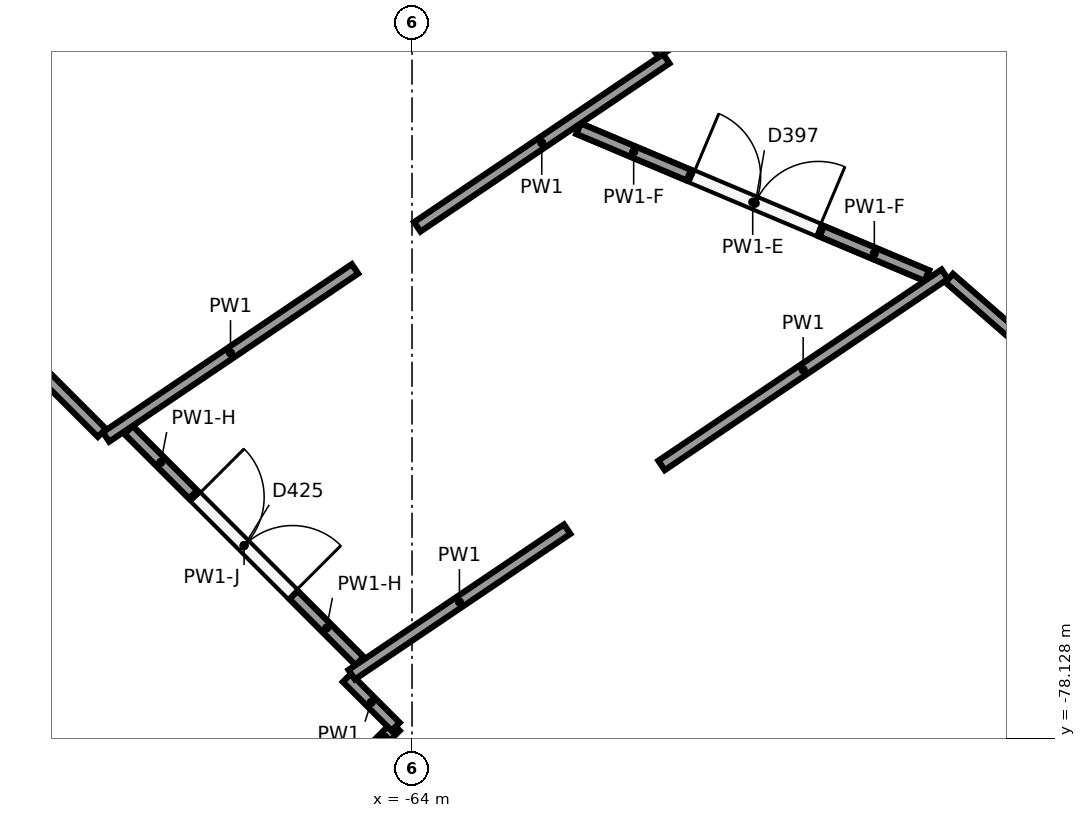
"""IFC4 building model, lengths in metres.
Left out: names, types, materials, properties, quantities, classifications, styles, units other than length and angle.
Written with IfcOpenShell. Run it as: python <this file> out.ifc"""

import sys

from ifc_helpers import new_model, si_unit, direction, frame, frame_2d, origin, origin_2d, place, context, subcontext, project, spatial, rectangle, circle, extrude, element, fill, save


model = new_model("IFC4")
c1 = context("Model", 3, precision=1e-05, world=origin(), true_north=direction((0.0, 1.0)))
c2 = subcontext(c1, "Body", "Model", "MODEL_VIEW")
j1 = project(units=[si_unit("LENGTHUNIT", "METRE"), si_unit("PLANEANGLEUNIT", "RADIAN")], contexts=[c1])
p1 = place(None, origin())
s1 = spatial("IfcSite", under=j1, at=p1, CompositionType="ELEMENT")
p2 = place(p1, origin())
s2 = spatial("IfcBuilding", under=s1, at=p2, CompositionType="ELEMENT")
p3 = place(p2, origin())
s3 = spatial("IfcBuildingStorey", under=s2, at=p3, CompositionType="ELEMENT", Elevation=0.0)
p4 = place(p3, frame((-63.068, -73.47, 0.0), z_axis=(0.0, 0.0, 1.0), x_axis=(1.0, 0.0, 0.0)))
e1 = element("IfcColumn", 1, at=p4, inside=s3, PredefinedType="COLUMN", context=c2, shape_type="SweptSolid", body=[
    extrude(circle(Radius=0.45, at=origin_2d()), origin(), (0.0, 0.0, 1.0), 6.5),
])
p5 = place(p3, frame((-60.655, -69.186, 0.0), z_axis=(0.0, 0.0, 1.0), x_axis=(-0.828805713465, -0.559536495081, 0.0)))
e2 = element("IfcWall", 2, at=p5, inside=s3, PredefinedType="PARTITIONING", context=c2, shape_type="SweptSolid", body=[
    extrude(rectangle(XDim=3.953, YDim=0.15, at=frame_2d((1.977, 0.0))), origin(), (0.0, 0.0, 1.0), 6.15),
])
p6 = place(p3, frame((-64.75, -71.951, 0.0), z_axis=(0.0, 0.0, 1.0), x_axis=(-0.828815019126, -0.559522710952, 0.0)))
e3 = element("IfcWall", 3, at=p6, inside=s3, PredefinedType="PARTITIONING", context=c2, shape_type="SweptSolid", body=[
    extrude(rectangle(XDim=3.953, YDim=0.15, at=frame_2d((1.977, 0.0))), origin(), (0.0, 0.0, 1.0), 6.15),
])
p7 = place(p3, frame((-68.08, -74.109, 0.0), z_axis=(0.0, 0.0, 1.0), x_axis=(-0.70712613939, 0.707087422453, 0.0)))
e4 = element("IfcWall", 4, at=p7, inside=s3, PredefinedType="PARTITIONING", context=c2, shape_type="SweptSolid", body=[
    extrude(rectangle(XDim=6.306, YDim=0.15, at=frame_2d((3.153, 0.0))), origin(), (0.0, 0.0, 1.0), 6.15),
])
p8 = place(p3, frame((-63.251, -65.301, 0.0), z_axis=(0.0, 0.0, 1.0), x_axis=(0.555582071925, -0.831461701677, 0.0)))
e5 = element("IfcWall", 5, at=p8, inside=s3, PredefinedType="PARTITIONING", context=c2, shape_type="SweptSolid", body=[
    extrude(rectangle(XDim=4.598, YDim=0.15, at=frame_2d((2.299, 0.0))), origin(), (0.0, 0.0, 1.0), 6.15),
])
p9 = place(p3, frame((-64.496, -78.254, 0.0), z_axis=(0.0, 0.0, 1.0), x_axis=(0.706798874946, 0.707414553409, 0.0)))
e6 = element("IfcWall", 6, at=p9, inside=s3, PredefinedType="PARTITIONING", context=c2, shape_type="SweptSolid", body=[
    extrude(rectangle(XDim=0.396, YDim=0.15, at=frame_2d((0.198, 0.0))), origin(), (0.0, 0.0, 1.0), 6.15),
])
p10 = place(p3, frame((-64.216, -77.973, 0.0), z_axis=(0.0, 0.0, 1.0), x_axis=(-0.707106781187, 0.707106781187, 0.0)))
e7 = element("IfcWall", 7, at=p10, inside=s3, PredefinedType="PARTITIONING", context=c2, shape_type="SweptSolid", body=[
    extrude(rectangle(XDim=0.907, YDim=0.15, at=frame_2d((0.454, 0.0))), origin(), (0.0, 0.0, 1.0), 6.15),
])
p11 = place(p3, frame((-64.794, -77.289, 0.0), z_axis=(0.0, 0.0, 1.0), x_axis=(0.828829640135, 0.559501052397, 0.0)))
e8 = element("IfcWall", 8, at=p11, inside=s3, PredefinedType="PARTITIONING", context=c2, shape_type="SweptSolid", body=[
    extrude(rectangle(XDim=3.42, YDim=0.15, at=frame_2d((1.71, 0.0))), origin(), (0.0, 0.0, 1.0), 6.15),
])
p12 = place(p3, frame((-60.717, -74.537, 0.0), z_axis=(0.0, 0.0, 1.0), x_axis=(0.828836712626, 0.559490575259, 0.0)))
e9 = element("IfcWall", 9, at=p12, inside=s3, PredefinedType="PARTITIONING", context=c2, shape_type="SweptSolid", body=[
    extrude(rectangle(XDim=4.496, YDim=0.15, at=frame_2d((2.248, 0.0))), origin(), (0.0, 0.0, 1.0), 6.15),
])
p13 = place(p3, frame((-56.932, -72.073, 0.0), z_axis=(0.0, 0.0, 1.0), x_axis=(0.753910661327, -0.656976951451, 0.0)))
e10 = element("IfcWall", 10, at=p13, inside=s3, PredefinedType="PARTITIONING", context=c2, shape_type="SweptSolid", body=[
    extrude(rectangle(XDim=4.473, YDim=0.15, at=frame_2d((2.237, 0.0))), origin(), (0.0, 0.0, 1.0), 6.15),
])
p14 = place(p3, frame((-67.729, -74.071, 0.0), z_axis=(0.0, 0.0, 1.0), x_axis=(0.707106781187, -0.707106781187, 0.0)))
e11 = element("IfcWall", 11, at=p14, inside=s3, PredefinedType="PARTITIONING", context=c2, shape_type="SweptSolid", body=[
    extrude(rectangle(XDim=4.298, YDim=0.15, at=frame_2d((2.149, 0.0))), origin(), (0.0, 0.0, 1.0), 5.05),
])
p15 = place(p14, frame((1.25, 0.0, 0.0)))
e12 = element("IfcOpeningElement", 12, at=p15, cuts=e11, PredefinedType="OPENING", context=c2, shape_type="SweptSolid", body=[
    extrude(rectangle(XDim=1.8, YDim=2.1, at=frame_2d((0.9, 1.05))), frame((0.0, 0.085, 0.0), z_axis=(0.0, -1.0, 0.0), x_axis=(1.0, 0.0, 0.0)), (0.0, 0.0, 1.0), 0.17),
])
p16 = place(p3, frame((-67.729, -74.071, 5.05), z_axis=(0.0, 0.0, 1.0), x_axis=(0.707106781187, -0.707106781187, 0.0)))
e13 = element("IfcWall", 13, at=p16, inside=s3, PredefinedType="PARTITIONING", context=c2, shape_type="SweptSolid", body=[
    extrude(rectangle(XDim=1.2, YDim=0.15, at=frame_2d((0.6, 0.0))), origin(), (0.0, 0.0, 1.0), 1.1),
])
p17 = place(p3, frame((-65.559, -76.241, 5.05), z_axis=(0.0, 0.0, 1.0), x_axis=(0.707106781187, -0.707106781187, 0.0)))
e14 = element("IfcWall", 14, at=p17, inside=s3, PredefinedType="PARTITIONING", context=c2, shape_type="SweptSolid", body=[
    extrude(rectangle(XDim=1.229, YDim=0.15, at=frame_2d((0.614, 0.0))), origin(), (0.0, 0.0, 1.0), 1.1),
])
p18 = place(p3, frame((-61.809, -70.106, 0.0), z_axis=(0.0, 0.0, 1.0), x_axis=(0.921339438191, -0.388759102316, 0.0)))
e15 = element("IfcWall", 15, at=p18, inside=s3, PredefinedType="PARTITIONING", context=c2, shape_type="SweptSolid", body=[
    extrude(rectangle(XDim=4.974, YDim=0.15, at=frame_2d((2.487, 0.0))), origin(), (0.0, 0.0, 1.0), 5.25),
])
p19 = place(p18, frame((1.624, 0.0, 0.0)))
e16 = element("IfcOpeningElement", 16, at=p19, cuts=e15, PredefinedType="OPENING", context=c2, shape_type="SweptSolid", body=[
    extrude(rectangle(XDim=1.8, YDim=2.1, at=frame_2d((0.9, 1.05))), frame((0.0, 0.085, 0.0), z_axis=(0.0, -1.0, 0.0), x_axis=(1.0, 0.0, 0.0)), (0.0, 0.0, 1.0), 0.17),
])
p20 = place(p3, frame((-58.608, -71.457, 5.25), z_axis=(0.0, 0.0, 1.0), x_axis=(0.92131952974, -0.388806280966, 0.0)))
e17 = element("IfcWall", 17, at=p20, inside=s3, PredefinedType="PARTITIONING", context=c2, shape_type="SweptSolid", body=[
    extrude(rectangle(XDim=1.5, YDim=0.15, at=frame_2d((0.75, 0.0))), origin(), (0.0, 0.0, 1.0), 0.9),
])
p21 = place(p3, frame((-61.809, -70.106, 5.25), z_axis=(0.0, 0.0, 1.0), x_axis=(0.921337247527, -0.38876429404, 0.0)))
e18 = element("IfcWall", 18, at=p21, inside=s3, PredefinedType="PARTITIONING", context=c2, shape_type="SweptSolid", body=[
    extrude(rectangle(XDim=1.574, YDim=0.15, at=frame_2d((0.787, 0.0))), origin(), (0.0, 0.0, 1.0), 0.9),
])
p22 = place(p15, origin())
e19 = element("IfcDoor", 19, at=p22, inside=s3, OperationType="DOUBLE_DOOR_SINGLE_SWING", PredefinedType="DOOR", context=c2, shape_type="SweptSolid", body=[
    extrude(rectangle(XDim=1.8, YDim=2.1, at=frame_2d((0.9, 1.05))), frame((0.0, 0.025, 0.0), z_axis=(0.0, -1.0, 0.0), x_axis=(1.0, 0.0, 0.0)), (0.0, 0.0, 1.0), 0.05),
])
fill(e12, e19)
p23 = place(p19, origin())
e20 = element("IfcDoor", 20, at=p23, inside=s3, OperationType="DOUBLE_DOOR_SINGLE_SWING", PredefinedType="DOOR", context=c2, shape_type="SweptSolid", body=[
    extrude(rectangle(XDim=1.8, YDim=2.1, at=frame_2d((0.9, 1.05))), frame((0.0, 0.025, 0.0), z_axis=(0.0, -1.0, 0.0), x_axis=(1.0, 0.0, 0.0)), (0.0, 0.0, 1.0), 0.05),
])
fill(e16, e20)
save(model, sys.argv[1])
